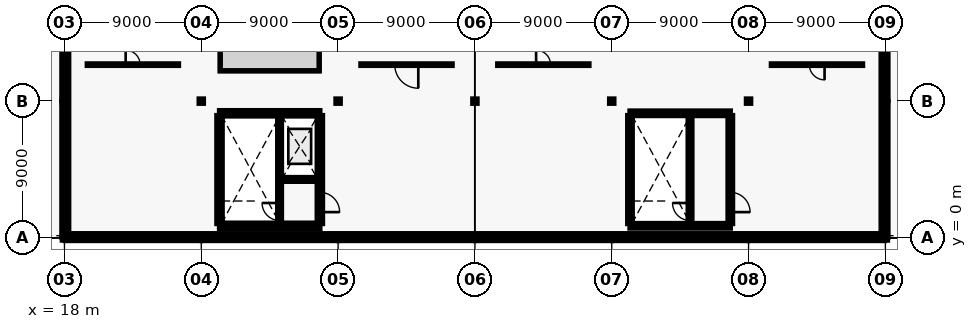
"""IFC4 building model, lengths in metres.
Left out: names, types, materials, properties, quantities, classifications, styles, units other than length and angle.
Written with IfcOpenShell. Run it as: python <this file> out.ifc"""

import sys

from ifc_helpers import new_model, si_unit, direction, frame, frame_2d, origin, origin_2d, place, context, subcontext, project, spatial, rectangle, i_section, extrude, element, fill, save


model = new_model("IFC4")
c1 = context("Model", 3, precision=1e-05, world=origin(), true_north=direction((0.0, 1.0)))
c2 = subcontext(c1, "Body", "Model", "MODEL_VIEW")
j1 = project(units=[si_unit("LENGTHUNIT", "METRE"), si_unit("PLANEANGLEUNIT", "RADIAN")], contexts=[c1])
p1 = place(None, origin())
s1 = spatial("IfcSite", under=j1, at=p1, CompositionType="ELEMENT")
p2 = place(p1, origin())
s2 = spatial("IfcBuilding", under=s1, at=p2, CompositionType="ELEMENT")
p3 = place(p2, frame((0.0, 0.0, 13.5)))
s3 = spatial("IfcBuildingStorey", under=s2, at=p3, CompositionType="ELEMENT", Elevation=13.5)
for number, where, z_axis, x_axis in (
    (1, (18.0, 0.0, 0.0), (0.0, 0.0, 1.0), (1.0, 0.0, 0.0)),
    (2, (18.0, 9.0, 0.0), (0.0, 0.0, 1.0), (1.0, 0.0, 0.0)),
    (3, (27.0, 0.0, 0.0), (0.0, 0.0, 1.0), (1.0, 0.0, 0.0)),
    (4, (27.0, 9.0, 0.0), (0.0, 0.0, 1.0), (1.0, 0.0, 0.0)),
    (5, (36.0, 0.0, 0.0), (0.0, 0.0, 1.0), (1.0, 0.0, 0.0)),
    (6, (36.0, 9.0, 0.0), (0.0, 0.0, 1.0), (1.0, 0.0, 0.0)),
    (7, (45.0, 0.0, 0.0), (0.0, 0.0, 1.0), (1.0, 0.0, 0.0)),
    (8, (45.0, 9.0, 0.0), (0.0, 0.0, 1.0), (1.0, 0.0, 0.0)),
    (9, (54.0, 0.0, 0.0), (0.0, 0.0, 1.0), (1.0, 0.0, 0.0)),
    (10, (54.0, 9.0, 0.0), (0.0, 0.0, 1.0), (1.0, 0.0, 0.0)),
    (11, (63.0, 0.0, 0.0), (0.0, 0.0, 1.0), (1.0, 0.0, 0.0)),
    (12, (63.0, 9.0, 0.0), (0.0, 0.0, 1.0), (1.0, 0.0, 0.0)),
    (13, (72.0, 0.0, 0.0), (0.0, 0.0, 1.0), (1.0, 0.0, 0.0)),
    (14, (72.0, 9.0, 0.0), (0.0, 0.0, 1.0), (1.0, 0.0, 0.0)),
):
    element("IfcColumn", number, at=place(p3, frame(where, z_axis=z_axis, x_axis=x_axis)), inside=s3, PredefinedType="COLUMN", context=c2, shape_type="SweptSolid", body=[
        extrude(i_section(OverallWidth=0.28, OverallDepth=0.28, WebThickness=0.01, FlangeThickness=0.018, FilletRadius=0.024, at=origin_2d()), origin(), (0.0, 0.0, 1.0), 3.9),
    ])
for number, where, z_axis, x_axis in (
    (15, (18.06, 0.0, 0.0), (0.0, 0.0, 1.0), (1.0, 0.0, 0.0)),
    (16, (27.06, 0.0, 0.0), (0.0, 0.0, 1.0), (1.0, 0.0, 0.0)),
    (17, (36.06, 0.0, 0.0), (0.0, 0.0, 1.0), (1.0, 0.0, 0.0)),
    (18, (45.06, 0.0, 0.0), (0.0, 0.0, 1.0), (1.0, 0.0, 0.0)),
    (19, (54.06, 0.0, 0.0), (0.0, 0.0, 1.0), (1.0, 0.0, 0.0)),
    (20, (63.06, 0.0, 0.0), (0.0, 0.0, 1.0), (1.0, 0.0, 0.0)),
    (21, (18.0, 0.06, 0.0), (0.0, 0.0, 1.0), (0.0, 1.0, 0.0)),
):
    element("IfcWall", number, at=place(p3, frame(where, z_axis=z_axis, x_axis=x_axis)), inside=s3, PredefinedType="SOLIDWALL", context=c2, shape_type="SweptSolid", body=[
        extrude(rectangle(XDim=8.88, YDim=0.34, at=frame_2d((4.44, 0.0))), origin(), (0.0, 0.0, 1.0), 3.2),
    ])
p4 = place(p3, frame((18.0, 9.06, 0.0), z_axis=(0.0, 0.0, 1.0), x_axis=(0.0, 1.0, 0.0)))
e22 = element("IfcWall", 22, at=p4, inside=s3, PredefinedType="SOLIDWALL", context=c2, shape_type="SweptSolid", body=[
    extrude(rectangle(XDim=8.88, YDim=0.34, at=frame_2d((4.44, 0.0))), origin(), (0.0, 0.0, 1.0), 3.2),
])
p5 = place(p4, frame((3.89, 0.0, 0.0)))
e23 = element("IfcOpeningElement", 23, at=p5, cuts=e22, PredefinedType="OPENING", context=c2, shape_type="SweptSolid", body=[
    extrude(rectangle(XDim=1.1, YDim=2.15, at=frame_2d((0.55, 1.075))), frame((0.0, 0.18, 0.0), z_axis=(0.0, -1.0, 0.0), x_axis=(1.0, 0.0, 0.0)), (0.0, 0.0, 1.0), 0.36),
])
p6 = place(p3, frame((72.0, 0.06, 0.0), z_axis=(0.0, 0.0, 1.0), x_axis=(0.0, 1.0, 0.0)))
e24 = element("IfcWall", 24, at=p6, inside=s3, PredefinedType="SOLIDWALL", context=c2, shape_type="SweptSolid", body=[
    extrude(rectangle(XDim=8.88, YDim=0.34, at=frame_2d((4.44, 0.0))), origin(), (0.0, 0.0, 1.0), 3.2),
])
p7 = place(p3, frame((72.0, 9.06, 0.0), z_axis=(0.0, 0.0, 1.0), x_axis=(0.0, 1.0, 0.0)))
e25 = element("IfcWall", 25, at=p7, inside=s3, PredefinedType="SOLIDWALL", context=c2, shape_type="SweptSolid", body=[
    extrude(rectangle(XDim=8.88, YDim=0.34, at=frame_2d((4.44, 0.0))), origin(), (0.0, 0.0, 1.0), 3.2),
])
p8 = place(p7, frame((3.84, 0.0, 0.0)))
e26 = element("IfcOpeningElement", 26, at=p8, cuts=e25, PredefinedType="OPENING", context=c2, shape_type="SweptSolid", body=[
    extrude(rectangle(XDim=1.2, YDim=2.15, at=frame_2d((0.6, 1.075))), frame((0.0, 0.18, 0.0), z_axis=(0.0, -1.0, 0.0), x_axis=(1.0, 0.0, 0.0)), (0.0, 0.0, 1.0), 0.36),
])
p9 = place(p3, frame((18.14, 0.14, 3.9), z_axis=(0.0, 0.0, 1.0), x_axis=(1.0, 0.0, 0.0)))
e27 = element("IfcWall", 27, at=p9, inside=s3, PredefinedType="PARAPET", context=c2, shape_type="SweptSolid", body=[
    extrude(rectangle(XDim=53.72, YDim=0.28, at=frame_2d((26.86, 0.0))), origin(), (0.0, 0.0, 1.0), 1.2),
])
for number, where, z_axis, x_axis in (
    (28, (18.14, 0.14, 3.9), (0.0, 0.0, 1.0), (0.0, 1.0, 0.0)),
    (29, (71.86, 0.14, 3.9), (0.0, 0.0, 1.0), (0.0, 1.0, 0.0)),
):
    element("IfcWall", number, at=place(p3, frame(where, z_axis=z_axis, x_axis=x_axis)), inside=s3, PredefinedType="PARAPET", context=c2, shape_type="SweptSolid", body=[
        extrude(rectangle(XDim=17.72, YDim=0.28, at=frame_2d((8.86, 0.0))), origin(), (0.0, 0.0, 1.0), 1.2),
    ])
for number, where, z_axis, x_axis in (
    (30, (28.2, 0.8, 0.0), (0.0, 0.0, 1.0), (1.0, 0.0, 0.0)),
    (31, (28.2, 8.2, 0.0), (0.0, 0.0, 1.0), (1.0, 0.0, 0.0)),
):
    element("IfcWall", number, at=place(p3, frame(where, z_axis=z_axis, x_axis=x_axis)), inside=s3, PredefinedType="SHEAR", context=c2, shape_type="SweptSolid", body=[
        extrude(rectangle(XDim=6.6, YDim=0.35, at=frame_2d((3.3, 0.0))), origin(), (0.0, 0.0, 1.0), 3.7),
    ])
p10 = place(p3, frame((28.2, 0.95, 0.0), z_axis=(0.0, 0.0, 1.0), x_axis=(0.0, 1.0, 0.0)))
e32 = element("IfcWall", 32, at=p10, inside=s3, PredefinedType="SHEAR", context=c2, shape_type="SweptSolid", body=[
    extrude(rectangle(XDim=7.1, YDim=0.35, at=frame_2d((3.55, 0.0))), origin(), (0.0, 0.0, 1.0), 3.7),
])
p11 = place(p3, frame((34.8, 0.95, 0.0), z_axis=(0.0, 0.0, 1.0), x_axis=(0.0, 1.0, 0.0)))
e33 = element("IfcWall", 33, at=p11, inside=s3, PredefinedType="SHEAR", context=c2, shape_type="SweptSolid", body=[
    extrude(rectangle(XDim=7.1, YDim=0.35, at=frame_2d((3.55, 0.0))), origin(), (0.0, 0.0, 1.0), 3.7),
])
p12 = place(p11, frame((0.75, 0.0, 0.0)))
e34 = element("IfcOpeningElement", 34, at=p12, cuts=e33, PredefinedType="OPENING", context=c2, shape_type="SweptSolid", body=[
    extrude(rectangle(XDim=1.3, YDim=2.15, at=frame_2d((0.65, 1.075))), frame((0.0, 0.185, 0.0), z_axis=(0.0, -1.0, 0.0), x_axis=(1.0, 0.0, 0.0)), (0.0, 0.0, 1.0), 0.37),
])
p13 = place(p3, frame((32.15, 0.95, 0.0), z_axis=(0.0, 0.0, 1.0), x_axis=(0.0, 1.0, 0.0)))
e35 = element("IfcWall", 35, at=p13, inside=s3, PredefinedType="SHEAR", context=c2, shape_type="SweptSolid", body=[
    extrude(rectangle(XDim=7.1, YDim=0.25, at=frame_2d((3.55, 0.0))), origin(), (0.0, 0.0, 1.0), 3.7),
])
p14 = place(p13, frame((0.2, 0.0, 0.0)))
e36 = element("IfcOpeningElement", 36, at=p14, cuts=e35, PredefinedType="OPENING", context=c2, shape_type="SweptSolid", body=[
    extrude(rectangle(XDim=1.15, YDim=2.15, at=frame_2d((0.575, 1.075))), frame((0.0, 0.135, 0.0), z_axis=(0.0, -1.0, 0.0), x_axis=(1.0, 0.0, 0.0)), (0.0, 0.0, 1.0), 0.27),
])
p15 = place(p3, frame((32.27, 3.85, 0.0), z_axis=(0.0, 0.0, 1.0), x_axis=(1.0, 0.0, 0.0)))
e37 = element("IfcWall", 37, at=p15, inside=s3, PredefinedType="SHEAR", context=c2, shape_type="SweptSolid", body=[
    extrude(rectangle(XDim=2.38, YDim=0.25, at=frame_2d((1.19, 0.0))), origin(), (0.0, 0.0, 1.0), 3.7),
])
p16 = place(p15, frame((0.64, 0.0, 0.0)))
e38 = element("IfcOpeningElement", 38, at=p16, cuts=e37, PredefinedType="OPENING", context=c2, shape_type="SweptSolid", body=[
    extrude(rectangle(XDim=1.1, YDim=2.15, at=frame_2d((0.55, 1.075))), frame((0.0, 0.135, 0.0), z_axis=(0.0, -1.0, 0.0), x_axis=(1.0, 0.0, 0.0)), (0.0, 0.0, 1.0), 0.27),
])
for number, where, z_axis, x_axis in (
    (39, (55.2, 0.8, 0.0), (0.0, 0.0, 1.0), (1.0, 0.0, 0.0)),
    (40, (55.2, 8.2, 0.0), (0.0, 0.0, 1.0), (1.0, 0.0, 0.0)),
):
    element("IfcWall", number, at=place(p3, frame(where, z_axis=z_axis, x_axis=x_axis)), inside=s3, PredefinedType="SHEAR", context=c2, shape_type="SweptSolid", body=[
        extrude(rectangle(XDim=6.6, YDim=0.3, at=frame_2d((3.3, 0.0))), origin(), (0.0, 0.0, 1.0), 3.7),
    ])
p17 = place(p3, frame((55.2, 0.95, 0.0), z_axis=(0.0, 0.0, 1.0), x_axis=(0.0, 1.0, 0.0)))
e41 = element("IfcWall", 41, at=p17, inside=s3, PredefinedType="SHEAR", context=c2, shape_type="SweptSolid", body=[
    extrude(rectangle(XDim=7.1, YDim=0.3, at=frame_2d((3.55, 0.0))), origin(), (0.0, 0.0, 1.0), 3.7),
])
p18 = place(p3, frame((61.8, 0.95, 0.0), z_axis=(0.0, 0.0, 1.0), x_axis=(0.0, 1.0, 0.0)))
e42 = element("IfcWall", 42, at=p18, inside=s3, PredefinedType="SHEAR", context=c2, shape_type="SweptSolid", body=[
    extrude(rectangle(XDim=7.1, YDim=0.3, at=frame_2d((3.55, 0.0))), origin(), (0.0, 0.0, 1.0), 3.7),
])
p19 = place(p18, frame((0.75, 0.0, 0.0)))
e43 = element("IfcOpeningElement", 43, at=p19, cuts=e42, PredefinedType="OPENING", context=c2, shape_type="SweptSolid", body=[
    extrude(rectangle(XDim=1.3, YDim=2.15, at=frame_2d((0.65, 1.075))), frame((0.0, 0.16, 0.0), z_axis=(0.0, -1.0, 0.0), x_axis=(1.0, 0.0, 0.0)), (0.0, 0.0, 1.0), 0.32),
])
p20 = place(p3, frame((59.15, 0.95, 0.0), z_axis=(0.0, 0.0, 1.0), x_axis=(0.0, 1.0, 0.0)))
e44 = element("IfcWall", 44, at=p20, inside=s3, PredefinedType="SHEAR", context=c2, shape_type="SweptSolid", body=[
    extrude(rectangle(XDim=7.1, YDim=0.25, at=frame_2d((3.55, 0.0))), origin(), (0.0, 0.0, 1.0), 3.7),
])
p21 = place(p20, frame((0.2, 0.0, 0.0)))
e45 = element("IfcOpeningElement", 45, at=p21, cuts=e44, PredefinedType="OPENING", context=c2, shape_type="SweptSolid", body=[
    extrude(rectangle(XDim=1.15, YDim=2.15, at=frame_2d((0.575, 1.075))), frame((0.0, 0.135, 0.0), z_axis=(0.0, -1.0, 0.0), x_axis=(1.0, 0.0, 0.0)), (0.0, 0.0, 1.0), 0.27),
])
p22 = place(p3, frame((19.5, 11.4, 0.0), z_axis=(0.0, 0.0, 1.0), x_axis=(1.0, 0.0, 0.0)))
e46 = element("IfcWall", 46, at=p22, inside=s3, PredefinedType="PARTITIONING", context=c2, shape_type="SweptSolid", body=[
    extrude(rectangle(XDim=6.0, YDim=0.1, at=frame_2d((3.0, 0.0))), origin(), (0.0, 0.0, 1.0), 2.9),
])
p23 = place(p22, frame((2.525, 0.0, 0.0)))
e47 = element("IfcOpeningElement", 47, at=p23, cuts=e46, PredefinedType="OPENING", context=c2, shape_type="SweptSolid", body=[
    extrude(rectangle(XDim=0.95, YDim=2.1, at=frame_2d((0.475, 1.05))), frame((0.0, 0.06, 0.0), z_axis=(0.0, -1.0, 0.0), x_axis=(1.0, 0.0, 0.0)), (0.0, 0.0, 1.0), 0.12),
])
p24 = place(p3, frame((37.5, 11.4, 0.0), z_axis=(0.0, 0.0, 1.0), x_axis=(1.0, 0.0, 0.0)))
e48 = element("IfcWall", 48, at=p24, inside=s3, PredefinedType="PARTITIONING", context=c2, shape_type="SweptSolid", body=[
    extrude(rectangle(XDim=6.0, YDim=0.1, at=frame_2d((3.0, 0.0))), origin(), (0.0, 0.0, 1.0), 2.9),
])
p25 = place(p24, frame((2.225, 0.0, 0.0)))
e49 = element("IfcOpeningElement", 49, at=p25, cuts=e48, PredefinedType="OPENING", context=c2, shape_type="SweptSolid", body=[
    extrude(rectangle(XDim=1.55, YDim=2.25, at=frame_2d((0.775, 1.125))), frame((0.0, 0.06, 0.0), z_axis=(0.0, -1.0, 0.0), x_axis=(1.0, 0.0, 0.0)), (0.0, 0.0, 1.0), 0.12),
])
p26 = place(p3, frame((46.5, 11.4, 0.0), z_axis=(0.0, 0.0, 1.0), x_axis=(1.0, 0.0, 0.0)))
e50 = element("IfcWall", 50, at=p26, inside=s3, PredefinedType="PARTITIONING", context=c2, shape_type="SweptSolid", body=[
    extrude(rectangle(XDim=6.0, YDim=0.1, at=frame_2d((3.0, 0.0))), origin(), (0.0, 0.0, 1.0), 2.9),
])
p27 = place(p26, frame((2.525, 0.0, 0.0)))
e51 = element("IfcOpeningElement", 51, at=p27, cuts=e50, PredefinedType="OPENING", context=c2, shape_type="SweptSolid", body=[
    extrude(rectangle(XDim=0.95, YDim=2.1, at=frame_2d((0.475, 1.05))), frame((0.0, 0.06, 0.0), z_axis=(0.0, -1.0, 0.0), x_axis=(1.0, 0.0, 0.0)), (0.0, 0.0, 1.0), 0.12),
])
p28 = place(p3, frame((64.5, 11.4, 0.0), z_axis=(0.0, 0.0, 1.0), x_axis=(1.0, 0.0, 0.0)))
e52 = element("IfcWall", 52, at=p28, inside=s3, PredefinedType="PARTITIONING", context=c2, shape_type="SweptSolid", body=[
    extrude(rectangle(XDim=6.0, YDim=0.1, at=frame_2d((3.0, 0.0))), origin(), (0.0, 0.0, 1.0), 2.9),
])
p29 = place(p28, frame((2.5, 0.0, 0.0)))
e53 = element("IfcOpeningElement", 53, at=p29, cuts=e52, PredefinedType="OPENING", context=c2, shape_type="SweptSolid", body=[
    extrude(rectangle(XDim=1.0, YDim=2.1, at=frame_2d((0.5, 1.05))), frame((0.0, 0.06, 0.0), z_axis=(0.0, -1.0, 0.0), x_axis=(1.0, 0.0, 0.0)), (0.0, 0.0, 1.0), 0.12),
])
p30 = place(p12, frame((1.3, 0.0, 0.0), z_axis=(0.0, 0.0, 1.0), x_axis=(-1.0, 0.0, 0.0)))
e54 = element("IfcDoor", 54, at=p30, inside=s3, OperationType="DOUBLE_DOOR_SINGLE_SWING", PredefinedType="DOOR", context=c2, shape_type="SweptSolid", body=[
    extrude(rectangle(XDim=1.3, YDim=2.15, at=frame_2d((0.65, 1.075))), frame((0.0, 0.025, 0.0), z_axis=(0.0, -1.0, 0.0), x_axis=(1.0, 0.0, 0.0)), (0.0, 0.0, 1.0), 0.05),
])
fill(e34, e54)
p31 = place(p14, frame((1.15, 0.0, 0.0), z_axis=(0.0, 0.0, 1.0), x_axis=(-1.0, 0.0, 0.0)))
e55 = element("IfcDoor", 55, at=p31, inside=s3, OperationType="SINGLE_SWING_RIGHT", PredefinedType="DOOR", context=c2, shape_type="SweptSolid", body=[
    extrude(rectangle(XDim=1.15, YDim=2.15, at=frame_2d((0.575, 1.075))), frame((0.0, 0.025, 0.0), z_axis=(0.0, -1.0, 0.0), x_axis=(1.0, 0.0, 0.0)), (0.0, 0.0, 1.0), 0.05),
])
fill(e36, e55)
p32 = place(p16, origin())
e56 = element("IfcDoor", 56, at=p32, inside=s3, OperationType="SLIDING_TO_LEFT", PredefinedType="DOOR", context=c2, shape_type="SweptSolid", body=[
    extrude(rectangle(XDim=1.1, YDim=2.15, at=frame_2d((0.55, 1.075))), frame((0.0, 0.025, 0.0), z_axis=(0.0, -1.0, 0.0), x_axis=(1.0, 0.0, 0.0)), (0.0, 0.0, 1.0), 0.05),
])
fill(e38, e56)
p33 = place(p19, frame((1.3, 0.0, 0.0), z_axis=(0.0, 0.0, 1.0), x_axis=(-1.0, 0.0, 0.0)))
e57 = element("IfcDoor", 57, at=p33, inside=s3, OperationType="DOUBLE_DOOR_SINGLE_SWING", PredefinedType="DOOR", context=c2, shape_type="SweptSolid", body=[
    extrude(rectangle(XDim=1.3, YDim=2.15, at=frame_2d((0.65, 1.075))), frame((0.0, 0.025, 0.0), z_axis=(0.0, -1.0, 0.0), x_axis=(1.0, 0.0, 0.0)), (0.0, 0.0, 1.0), 0.05),
])
fill(e43, e57)
p34 = place(p21, frame((1.15, 0.0, 0.0), z_axis=(0.0, 0.0, 1.0), x_axis=(-1.0, 0.0, 0.0)))
e58 = element("IfcDoor", 58, at=p34, inside=s3, OperationType="SINGLE_SWING_RIGHT", PredefinedType="DOOR", context=c2, shape_type="SweptSolid", body=[
    extrude(rectangle(XDim=1.15, YDim=2.15, at=frame_2d((0.575, 1.075))), frame((0.0, 0.025, 0.0), z_axis=(0.0, -1.0, 0.0), x_axis=(1.0, 0.0, 0.0)), (0.0, 0.0, 1.0), 0.05),
])
fill(e45, e58)
p35 = place(p23, origin())
e59 = element("IfcDoor", 59, at=p35, inside=s3, OperationType="SINGLE_SWING_LEFT", PredefinedType="DOOR", context=c2, shape_type="SweptSolid", body=[
    extrude(rectangle(XDim=0.95, YDim=2.1, at=frame_2d((0.475, 1.05))), frame((0.0, 0.025, 0.0), z_axis=(0.0, -1.0, 0.0), x_axis=(1.0, 0.0, 0.0)), (0.0, 0.0, 1.0), 0.05),
])
fill(e47, e59)
p36 = place(p25, origin())
e60 = element("IfcDoor", 60, at=p36, inside=s3, OperationType="SINGLE_SWING_RIGHT", PredefinedType="DOOR", context=c2, shape_type="SweptSolid", body=[
    extrude(rectangle(XDim=1.55, YDim=2.25, at=frame_2d((0.775, 1.125))), frame((0.0, 0.025, 0.0), z_axis=(0.0, -1.0, 0.0), x_axis=(1.0, 0.0, 0.0)), (0.0, 0.0, 1.0), 0.05),
])
fill(e49, e60)
p37 = place(p27, origin())
e61 = element("IfcDoor", 61, at=p37, inside=s3, OperationType="SINGLE_SWING_LEFT", PredefinedType="DOOR", context=c2, shape_type="SweptSolid", body=[
    extrude(rectangle(XDim=0.95, YDim=2.1, at=frame_2d((0.475, 1.05))), frame((0.0, 0.025, 0.0), z_axis=(0.0, -1.0, 0.0), x_axis=(1.0, 0.0, 0.0)), (0.0, 0.0, 1.0), 0.05),
])
fill(e51, e61)
p38 = place(p29, origin())
e62 = element("IfcDoor", 62, at=p38, inside=s3, OperationType="SINGLE_SWING_RIGHT", PredefinedType="DOOR", context=c2, shape_type="SweptSolid", body=[
    extrude(rectangle(XDim=1.0, YDim=2.1, at=frame_2d((0.5, 1.05))), frame((0.0, 0.025, 0.0), z_axis=(0.0, -1.0, 0.0), x_axis=(1.0, 0.0, 0.0)), (0.0, 0.0, 1.0), 0.05),
])
fill(e53, e62)
save(model, sys.argv[1])
